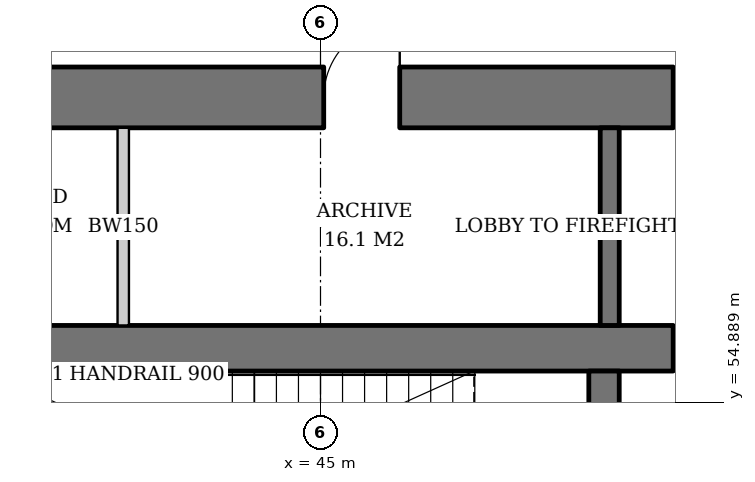
"""IFC4 building model, lengths in metres.
Left out: names, types, materials, properties, quantities, classifications, styles, units other than length and angle.
Written with IfcOpenShell. Run it as: python <this file> out.ifc"""

import sys

from ifc_helpers import new_model, si_unit, direction, frame, frame_2d, origin, place, context, subcontext, project, spatial, rectangle, extrude, element, fill, save


model = new_model("IFC4")
c1 = context("Model", 3, precision=1e-05, world=origin(), true_north=direction((0.0, 1.0)))
c2 = subcontext(c1, "Body", "Model", "MODEL_VIEW")
j1 = project(units=[si_unit("LENGTHUNIT", "METRE"), si_unit("PLANEANGLEUNIT", "RADIAN")], contexts=[c1])
p1 = place(None, origin())
s1 = spatial("IfcSite", under=j1, at=p1, CompositionType="ELEMENT")
p2 = place(p1, origin())
s2 = spatial("IfcBuilding", under=s1, at=p2, CompositionType="ELEMENT")
p3 = place(p2, frame((0.0, 0.0, 78.0)))
s3 = spatial("IfcBuildingStorey", under=s2, at=p3, CompositionType="ELEMENT", Elevation=78.0)
p4 = place(p3, frame((35.1, 55.6, 0.0), z_axis=(0.0, 0.0, 1.0), x_axis=(1.0, 0.0, 0.0)))
e1 = element("IfcWall", 1, at=p4, inside=s3, PredefinedType="SHEAR", context=c2, shape_type="SweptSolid", body=[
    extrude(rectangle(XDim=19.8, YDim=0.6, at=frame_2d((9.9, 0.0))), origin(), (0.0, 0.0, 1.0), 3.8),
])
p5 = place(p4, frame((14.54, 0.0, 0.0)))
e2 = element("IfcOpeningElement", 2, at=p5, cuts=e1, PredefinedType="OPENING", context=c2, shape_type="SweptSolid", body=[
    extrude(rectangle(XDim=1.0, YDim=2.1, at=frame_2d((0.5, 1.05))), frame((0.0, 0.31, 0.0), z_axis=(0.0, -1.0, 0.0), x_axis=(1.0, 0.0, 0.0)), (0.0, 0.0, 1.0), 0.62),
])
p6 = place(p4, frame((2.425, 0.0, 0.0)))
e3 = element("IfcOpeningElement", 3, at=p6, cuts=e1, PredefinedType="OPENING", context=c2, shape_type="SweptSolid", body=[
    extrude(rectangle(XDim=1.0, YDim=2.1, at=frame_2d((0.5, 1.05))), frame((0.0, 0.31, 0.0), z_axis=(0.0, -1.0, 0.0), x_axis=(1.0, 0.0, 0.0)), (0.0, 0.0, 1.0), 0.62),
])
p7 = place(p3, frame((31.7, 58.9, 0.0), z_axis=(0.0, 0.0, 1.0), x_axis=(1.0, 0.0, 0.0)))
e4 = element("IfcWall", 4, at=p7, inside=s3, PredefinedType="SHEAR", context=c2, shape_type="SweptSolid", body=[
    extrude(rectangle(XDim=26.6, YDim=0.8, at=frame_2d((13.3, 0.0))), origin(), (0.0, 0.0, 1.0), 3.8),
])
p8 = place(p7, frame((17.94, 0.0, 0.0)))
e5 = element("IfcOpeningElement", 5, at=p8, cuts=e4, PredefinedType="OPENING", context=c2, shape_type="SweptSolid", body=[
    extrude(rectangle(XDim=1.0, YDim=2.1, at=frame_2d((0.5, 1.05))), frame((0.0, 0.41, 0.0), z_axis=(0.0, -1.0, 0.0), x_axis=(1.0, 0.0, 0.0)), (0.0, 0.0, 1.0), 0.82),
])
p9 = place(p7, frame((5.825, 0.0, 0.0)))
e6 = element("IfcOpeningElement", 6, at=p9, cuts=e4, PredefinedType="OPENING", context=c2, shape_type="SweptSolid", body=[
    extrude(rectangle(XDim=1.0, YDim=2.1, at=frame_2d((0.5, 1.05))), frame((0.0, 0.41, 0.0), z_axis=(0.0, -1.0, 0.0), x_axis=(1.0, 0.0, 0.0)), (0.0, 0.0, 1.0), 0.82),
])
p10 = place(p7, frame((1.05, 0.0, 0.0)))
e7 = element("IfcOpeningElement", 7, at=p10, cuts=e4, PredefinedType="OPENING", context=c2, shape_type="SweptSolid", body=[
    extrude(rectangle(XDim=1.0, YDim=2.1, at=frame_2d((0.5, 1.05))), frame((0.0, 0.41, 0.0), z_axis=(0.0, -1.0, 0.0), x_axis=(1.0, 0.0, 0.0)), (0.0, 0.0, 1.0), 0.82),
])
p11 = place(p7, frame((2.637, 0.0, 0.0)))
e8 = element("IfcOpeningElement", 8, at=p11, cuts=e4, PredefinedType="OPENING", context=c2, shape_type="SweptSolid", body=[
    extrude(rectangle(XDim=1.0, YDim=2.1, at=frame_2d((0.5, 1.05))), frame((0.0, 0.41, 0.0), z_axis=(0.0, -1.0, 0.0), x_axis=(1.0, 0.0, 0.0)), (0.0, 0.0, 1.0), 0.82),
])
p12 = place(p7, frame((4.229, 0.0, 0.0)))
e9 = element("IfcOpeningElement", 9, at=p12, cuts=e4, PredefinedType="OPENING", context=c2, shape_type="SweptSolid", body=[
    extrude(rectangle(XDim=1.0, YDim=2.1, at=frame_2d((0.5, 1.05))), frame((0.0, 0.41, 0.0), z_axis=(0.0, -1.0, 0.0), x_axis=(1.0, 0.0, 0.0)), (0.0, 0.0, 1.0), 0.82),
])
p13 = place(p7, frame((8.44, 0.0, 0.0)))
e10 = element("IfcOpeningElement", 10, at=p13, cuts=e4, PredefinedType="OPENING", context=c2, shape_type="SweptSolid", body=[
    extrude(rectangle(XDim=1.0, YDim=2.1, at=frame_2d((0.5, 1.05))), frame((0.0, 0.41, 0.0), z_axis=(0.0, -1.0, 0.0), x_axis=(1.0, 0.0, 0.0)), (0.0, 0.0, 1.0), 0.82),
])
p14 = place(p7, frame((13.342, 0.0, 0.0)))
e11 = element("IfcOpeningElement", 11, at=p14, cuts=e4, PredefinedType="OPENING", context=c2, shape_type="SweptSolid", body=[
    extrude(rectangle(XDim=1.0, YDim=2.1, at=frame_2d((0.5, 1.05))), frame((0.0, 0.41, 0.0), z_axis=(0.0, -1.0, 0.0), x_axis=(1.0, 0.0, 0.0)), (0.0, 0.0, 1.0), 0.82),
])
p15 = place(p7, frame((22.35, 0.0, 0.0)))
e12 = element("IfcOpeningElement", 12, at=p15, cuts=e4, PredefinedType="OPENING", context=c2, shape_type="SweptSolid", body=[
    extrude(rectangle(XDim=1.0, YDim=2.1, at=frame_2d((0.5, 1.05))), frame((0.0, 0.41, 0.0), z_axis=(0.0, -1.0, 0.0), x_axis=(1.0, 0.0, 0.0)), (0.0, 0.0, 1.0), 0.82),
])
p16 = place(p3, frame((48.73, 52.4, 0.0), z_axis=(0.0, 0.0, 1.0), x_axis=(0.0, 1.0, 0.0)))
e13 = element("IfcWall", 13, at=p16, inside=s3, PredefinedType="SHEAR", context=c2, shape_type="SweptSolid", body=[
    extrude(rectangle(XDim=2.9, YDim=0.4, at=frame_2d((1.45, 0.0))), origin(), (0.0, 0.0, 1.0), 3.8),
])
p17 = place(p16, frame((0.3, 0.0, 0.0)))
e14 = element("IfcOpeningElement", 14, at=p17, cuts=e13, PredefinedType="OPENING", context=c2, shape_type="SweptSolid", body=[
    extrude(rectangle(XDim=1.0, YDim=2.1, at=frame_2d((0.5, 1.05))), frame((0.0, 0.21, 0.0), z_axis=(0.0, -1.0, 0.0), x_axis=(1.0, 0.0, 0.0)), (0.0, 0.0, 1.0), 0.42),
])
p18 = place(p3, frame((48.805, 55.9, 0.0), z_axis=(0.0, 0.0, 1.0), x_axis=(0.0, 1.0, 0.0)))
e15 = element("IfcWall", 15, at=p18, inside=s3, PredefinedType="SOLIDWALL", context=c2, shape_type="SweptSolid", body=[
    extrude(rectangle(XDim=2.6, YDim=0.25, at=frame_2d((1.3, 0.0))), origin(), (0.0, 0.0, 1.0), 3.52),
])
p19 = place(p3, frame((42.405, 55.9, 0.0), z_axis=(0.0, 0.0, 1.0), x_axis=(0.0, 1.0, 0.0)))
e16 = element("IfcWall", 16, at=p19, inside=s3, PredefinedType="SOLIDWALL", context=c2, shape_type="SweptSolid", body=[
    extrude(rectangle(XDim=2.6, YDim=0.15, at=frame_2d((1.3, 0.0))), origin(), (0.0, 0.0, 1.0), 3.52),
])
p20 = place(p5, origin())
e17 = element("IfcDoor", 17, at=p20, inside=s3, OperationType="SINGLE_SWING_RIGHT", PredefinedType="DOOR", context=c2, shape_type="SweptSolid", body=[
    extrude(rectangle(XDim=1.0, YDim=2.1, at=frame_2d((0.5, 1.05))), frame((0.0, 0.025, 0.0), z_axis=(0.0, -1.0, 0.0), x_axis=(1.0, 0.0, 0.0)), (0.0, 0.0, 1.0), 0.05),
])
fill(e2, e17)
p21 = place(p8, origin())
e18 = element("IfcDoor", 18, at=p21, inside=s3, OperationType="SINGLE_SWING_RIGHT", PredefinedType="DOOR", context=c2, shape_type="SweptSolid", body=[
    extrude(rectangle(XDim=1.0, YDim=2.1, at=frame_2d((0.5, 1.05))), frame((0.0, 0.025, 0.0), z_axis=(0.0, -1.0, 0.0), x_axis=(1.0, 0.0, 0.0)), (0.0, 0.0, 1.0), 0.05),
])
fill(e5, e18)
p22 = place(p14, origin())
e19 = element("IfcDoor", 19, at=p22, inside=s3, OperationType="SINGLE_SWING_RIGHT", PredefinedType="DOOR", context=c2, shape_type="SweptSolid", body=[
    extrude(rectangle(XDim=1.0, YDim=2.1, at=frame_2d((0.5, 1.05))), frame((0.0, -0.34, 0.0), z_axis=(0.0, -1.0, 0.0), x_axis=(1.0, 0.0, 0.0)), (0.0, 0.0, 1.0), 0.05),
])
fill(e11, e19)
save(model, sys.argv[1])
